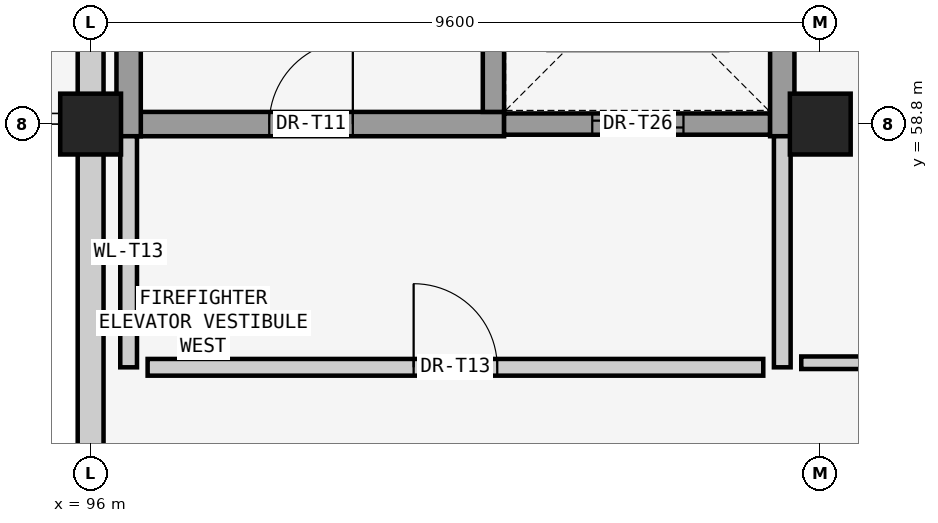
"""IFC4 building model, lengths in metres.
Left out: names, types, materials, properties, quantities, classifications, styles, units other than length and angle.
Written with IfcOpenShell. Run it as: python <this file> out.ifc"""

import sys

from ifc_helpers import new_model, si_unit, direction, frame, frame_2d, origin, origin_2d, place, context, subcontext, project, spatial, rectangle, extrude, element, fill, save


model = new_model("IFC4")
c1 = context("Model", 3, precision=1e-05, world=origin(), true_north=direction((0.0, 1.0)))
c2 = subcontext(c1, "Body", "Model", "MODEL_VIEW")
j1 = project(units=[si_unit("LENGTHUNIT", "METRE"), si_unit("PLANEANGLEUNIT", "RADIAN")], contexts=[c1])
p1 = place(None, origin())
s1 = spatial("IfcSite", under=j1, at=p1, CompositionType="ELEMENT")
p2 = place(p1, origin())
s2 = spatial("IfcBuilding", under=s1, at=p2, CompositionType="ELEMENT")
p3 = place(p2, frame((0.0, 0.0, 5.4)))
s3 = spatial("IfcBuildingStorey", under=s2, at=p3, CompositionType="ELEMENT", Elevation=5.4)
for number, where, z_axis, x_axis in (
    (1, (96.0, 58.8, 0.0), (0.0, 0.0, 1.0), (1.0, 0.0, 0.0)),
    (2, (105.6, 58.8, 0.0), (0.0, 0.0, 1.0), (1.0, 0.0, 0.0)),
):
    element("IfcColumn", number, at=place(p3, frame(where, z_axis=z_axis, x_axis=x_axis)), inside=s3, PredefinedType="COLUMN", context=c2, shape_type="SweptSolid", body=[
        extrude(rectangle(XDim=0.8, YDim=0.8, at=origin_2d()), origin(), (0.0, 0.0, 1.0), 4.54),
    ])
p4 = place(p3, frame((96.0, 52.012, 0.0), z_axis=(0.0, 0.0, 1.0), x_axis=(0.0, 1.0, 0.0)))
e3 = element("IfcWall", 3, at=p4, inside=s3, PredefinedType="SOLIDWALL", context=c2, shape_type="SweptSolid", body=[
    extrude(rectangle(XDim=15.158, YDim=0.34, at=frame_2d((7.579, 0.0))), origin(), (0.0, 0.0, 1.0), 3.82),
])
p5 = place(p3, frame((96.66, 58.8, 0.0), z_axis=(0.0, 0.0, 1.0), x_axis=(1.0, 0.0, 0.0)))
e4 = element("IfcWall", 4, at=p5, inside=s3, PredefinedType="SHEAR", context=c2, shape_type="SweptSolid", body=[
    extrude(rectangle(XDim=4.78, YDim=0.32, at=frame_2d((2.39, 0.0))), origin(), (0.0, 0.0, 1.0), 4.52),
])
p6 = place(p5, frame((1.69, 0.0, 0.0)))
e5 = element("IfcOpeningElement", 5, at=p6, cuts=e4, PredefinedType="OPENING", context=c2, shape_type="SweptSolid", body=[
    extrude(rectangle(XDim=1.1, YDim=2.2, at=frame_2d((0.55, 1.1))), frame((0.0, 0.17, 0.0), z_axis=(0.0, -1.0, 0.0), x_axis=(1.0, 0.0, 0.0)), (0.0, 0.0, 1.0), 0.34),
])
p7 = place(p3, frame((101.44, 58.8, 0.0), z_axis=(0.0, 0.0, 1.0), x_axis=(1.0, 0.0, 0.0)))
e6 = element("IfcWall", 6, at=p7, inside=s3, PredefinedType="SHEAR", context=c2, shape_type="SweptSolid", body=[
    extrude(rectangle(XDim=3.5, YDim=0.28, at=frame_2d((1.75, 0.0))), origin(), (0.0, 0.0, 1.0), 4.52),
])
p8 = place(p7, frame((1.16, 0.0, 0.0)))
e7 = element("IfcOpeningElement", 7, at=p8, cuts=e6, PredefinedType="OPENING", context=c2, shape_type="SweptSolid", body=[
    extrude(rectangle(XDim=1.2, YDim=2.2, at=frame_2d((0.6, 1.1))), frame((0.0, 0.15, 0.0), z_axis=(0.0, -1.0, 0.0), x_axis=(1.0, 0.0, 0.0)), (0.0, 0.0, 1.0), 0.3),
])
for number, where, z_axis, x_axis in (
    (8, (96.5, 67.0, 0.0), (0.0, 0.0, 1.0), (0.0, -1.0, 0.0)),
    (9, (105.1, 58.64, 0.0), (0.0, 0.0, 1.0), (0.0, 1.0, 0.0)),
):
    element("IfcWall", number, at=place(p3, frame(where, z_axis=z_axis, x_axis=x_axis)), inside=s3, PredefinedType="SHEAR", context=c2, shape_type="SweptSolid", body=[
        extrude(rectangle(XDim=8.36, YDim=0.32, at=frame_2d((4.18, 0.0))), origin(), (0.0, 0.0, 1.0), 4.52),
    ])
p9 = place(p3, frame((101.3, 58.96, 0.0), z_axis=(0.0, 0.0, 1.0), x_axis=(0.0, 1.0, 0.0)))
e10 = element("IfcWall", 10, at=p9, inside=s3, PredefinedType="SHEAR", context=c2, shape_type="SweptSolid", body=[
    extrude(rectangle(XDim=7.72, YDim=0.28, at=frame_2d((3.86, 0.0))), origin(), (0.0, 0.0, 1.0), 4.52),
])
for number, where, z_axis, x_axis in (
    (11, (96.5, 55.6, 0.0), (0.0, 0.0, 1.0), (0.0, 1.0, 0.0)),
    (12, (105.1, 55.6, 0.0), (0.0, 0.0, 1.0), (0.0, 1.0, 0.0)),
):
    element("IfcWall", number, at=place(p3, frame(where, z_axis=z_axis, x_axis=x_axis)), inside=s3, PredefinedType="SOLIDWALL", context=c2, shape_type="SweptSolid", body=[
        extrude(rectangle(XDim=3.04, YDim=0.22, at=frame_2d((1.52, 0.0))), origin(), (0.0, 0.0, 1.0), 4.32),
    ])
p10 = place(p3, frame((96.75, 55.6, 0.0), z_axis=(0.0, 0.0, 1.0), x_axis=(1.0, 0.0, 0.0)))
e13 = element("IfcWall", 13, at=p10, inside=s3, PredefinedType="SOLIDWALL", context=c2, shape_type="SweptSolid", body=[
    extrude(rectangle(XDim=8.1, YDim=0.22, at=frame_2d((4.05, 0.0))), origin(), (0.0, 0.0, 1.0), 4.32),
])
p11 = place(p10, frame((3.5, 0.0, 0.0)))
e14 = element("IfcOpeningElement", 14, at=p11, cuts=e13, PredefinedType="OPENING", context=c2, shape_type="SweptSolid", body=[
    extrude(rectangle(XDim=1.1, YDim=2.2, at=frame_2d((0.55, 1.1))), frame((0.0, 0.12, 0.0), z_axis=(0.0, -1.0, 0.0), x_axis=(1.0, 0.0, 0.0)), (0.0, 0.0, 1.0), 0.24),
])
p12 = place(p3, frame((105.35, 55.66, 0.0), z_axis=(0.0, 0.0, 1.0), x_axis=(1.0, 0.0, 0.0)))
e15 = element("IfcWall", 15, at=p12, inside=s3, PredefinedType="PARTITIONING", context=c2, shape_type="SweptSolid", body=[
    extrude(rectangle(XDim=10.05, YDim=0.165, at=frame_2d((5.025, 0.0))), origin(), (0.0, 0.0, 1.0), 4.48),
])
p13 = place(p6, origin())
e16 = element("IfcDoor", 16, at=p13, inside=s3, OperationType="SINGLE_SWING_RIGHT", PredefinedType="DOOR", context=c2, shape_type="SweptSolid", body=[
    extrude(rectangle(XDim=1.1, YDim=2.2, at=frame_2d((0.55, 1.1))), frame((0.0, 0.025, 0.0), z_axis=(0.0, -1.0, 0.0), x_axis=(1.0, 0.0, 0.0)), (0.0, 0.0, 1.0), 0.05),
])
fill(e5, e16)
p14 = place(p8, origin())
e17 = element("IfcDoor", 17, at=p14, inside=s3, OperationType="SLIDING_TO_RIGHT", PredefinedType="DOOR", context=c2, shape_type="SweptSolid", body=[
    extrude(rectangle(XDim=1.2, YDim=2.2, at=frame_2d((0.6, 1.1))), frame((0.0, 0.025, 0.0), z_axis=(0.0, -1.0, 0.0), x_axis=(1.0, 0.0, 0.0)), (0.0, 0.0, 1.0), 0.05),
])
fill(e7, e17)
p15 = place(p11, origin())
e18 = element("IfcDoor", 18, at=p15, inside=s3, OperationType="SINGLE_SWING_LEFT", PredefinedType="DOOR", context=c2, shape_type="SweptSolid", body=[
    extrude(rectangle(XDim=1.1, YDim=2.2, at=frame_2d((0.55, 1.1))), frame((0.0, 0.025, 0.0), z_axis=(0.0, -1.0, 0.0), x_axis=(1.0, 0.0, 0.0)), (0.0, 0.0, 1.0), 0.05),
])
fill(e14, e18)
save(model, sys.argv[1])
